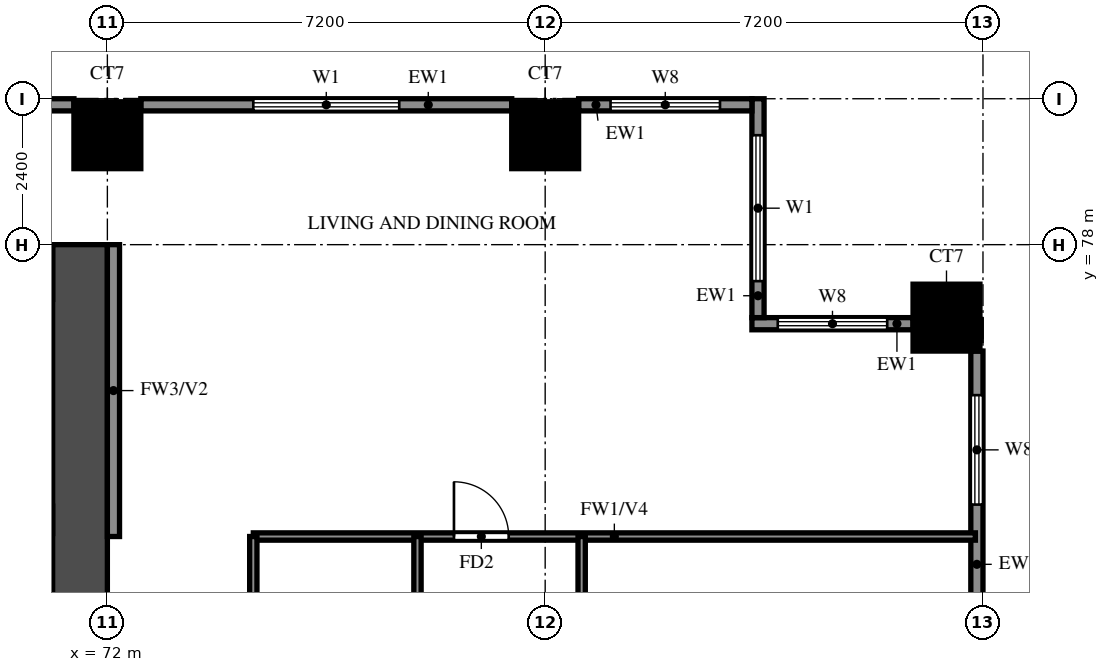
"""IFC4 building model, lengths in metres.
Left out: names, types, materials, properties, quantities, classifications, styles, units other than length and angle.
Written with IfcOpenShell. Run it as: python <this file> out.ifc"""

import sys

from ifc_helpers import new_model, si_unit, direction, frame, frame_2d, origin, origin_2d, place, context, subcontext, project, spatial, rectangle, extrude, source, transform, mapped, element, fill, save


model = new_model("IFC4")
c1 = context("Model", 3, precision=1e-05, world=origin(), true_north=direction((0.0, 1.0)))
c2 = subcontext(c1, "Body", "Model", "MODEL_VIEW")
j1 = project(units=[si_unit("LENGTHUNIT", "METRE"), si_unit("PLANEANGLEUNIT", "RADIAN")], contexts=[c1])
p1 = place(None, origin())
s1 = spatial("IfcSite", under=j1, at=p1, CompositionType="ELEMENT")
p2 = place(p1, origin())
s2 = spatial("IfcBuilding", under=s1, at=p2, CompositionType="ELEMENT")
p3 = place(p2, frame((0.0, 0.0, 51.5)))
s3 = spatial("IfcBuildingStorey", under=s2, at=p3, CompositionType="ELEMENT", Elevation=51.5)
m1 = source(origin(), c2, "Body", "SweptSolid", [
    extrude(rectangle(XDim=1.1, YDim=1.1, at=origin_2d()), origin(), (0.0, 0.0, 1.0), 3.18),
])
for number, where, z_axis, x_axis in (
    (1, (85.8, 76.8, 0.0), (0.0, 0.0, 1.0), (1.0, 0.0, 0.0)),
    (2, (72.0, 79.8, 0.0), (0.0, 0.0, 1.0), (1.0, 0.0, 0.0)),
    (3, (79.2, 79.8, 0.0), (0.0, 0.0, 1.0), (1.0, 0.0, 0.0)),
):
    element("IfcColumn", number, at=place(p3, frame(where, z_axis=z_axis, x_axis=x_axis)), inside=s3, PredefinedType="COLUMN", context=c2, shape_type="MappedRepresentation", body=[
        mapped(m1, transform((0.0, 0.0, 0.0))),
    ])
p4 = place(p3, frame((71.55, 66.0, 0.0), z_axis=(0.0, 0.0, 1.0), x_axis=(0.0, 1.0, 0.0)))
e4 = element("IfcWall", 4, at=p4, inside=s3, PredefinedType="SHEAR", context=c2, shape_type="SweptSolid", body=[
    extrude(rectangle(XDim=12.0, YDim=0.9, at=frame_2d((6.0, 0.0))), origin(), (0.0, 0.0, 1.0), 3.18),
])
p5 = place(p3, frame((29.7, 77.55, 0.0), z_axis=(0.0, 0.0, 1.0), x_axis=(1.0, 0.0, 0.0)))
e5 = element("IfcWall", 5, at=p5, inside=s3, PredefinedType="SHEAR", context=c2, shape_type="SweptSolid", body=[
    extrude(rectangle(XDim=41.4, YDim=0.9, at=frame_2d((20.7, 0.0))), origin(), (0.0, 0.0, 1.0), 3.18),
])
p6 = place(p3, frame((86.3, 70.15, 0.0), z_axis=(0.0, 0.0, 1.0), x_axis=(0.0, 1.0, 0.0)))
e6 = element("IfcWall", 6, at=p6, inside=s3, PredefinedType="SOLIDWALL", context=c2, shape_type="SweptSolid", body=[
    extrude(rectangle(XDim=6.1, YDim=0.2, at=frame_2d((3.05, 0.0))), origin(), (0.0, 0.0, 1.0), 3.18),
])
p7 = place(p6, frame((1.175, 0.0, 1.5)))
e7 = element("IfcOpeningElement", 7, at=p7, cuts=e6, PredefinedType="OPENING", context=c2, shape_type="SweptSolid", body=[
    extrude(rectangle(XDim=0.9, YDim=0.9, at=frame_2d((0.45, 0.45))), frame((0.0, 0.11, 0.0), z_axis=(0.0, -1.0, 0.0), x_axis=(1.0, 0.0, 0.0)), (0.0, 0.0, 1.0), 0.22),
])
p8 = place(p6, frame((3.575, 0.0, 0.6)))
e8 = element("IfcOpeningElement", 8, at=p8, cuts=e6, PredefinedType="OPENING", context=c2, shape_type="SweptSolid", body=[
    extrude(rectangle(XDim=1.8, YDim=2.4, at=frame_2d((0.9, 1.2))), frame((0.0, 0.11, 0.0), z_axis=(0.0, -1.0, 0.0), x_axis=(1.0, 0.0, 0.0)), (0.0, 0.0, 1.0), 0.22),
])
p9 = place(p3, frame((85.25, 76.7, 0.0), z_axis=(0.0, 0.0, 1.0), x_axis=(-1.0, 0.0, 0.0)))
e9 = element("IfcWall", 9, at=p9, inside=s3, PredefinedType="SOLIDWALL", context=c2, shape_type="SweptSolid", body=[
    extrude(rectangle(XDim=2.65, YDim=0.2, at=frame_2d((1.325, 0.0))), origin(), (0.0, 0.0, 1.0), 3.18),
])
p10 = place(p9, frame((0.425, 0.0, 0.6)))
e10 = element("IfcOpeningElement", 10, at=p10, cuts=e9, PredefinedType="OPENING", context=c2, shape_type="SweptSolid", body=[
    extrude(rectangle(XDim=1.8, YDim=2.4, at=frame_2d((0.9, 1.2))), frame((0.0, 0.11, 0.0), z_axis=(0.0, -1.0, 0.0), x_axis=(1.0, 0.0, 0.0)), (0.0, 0.0, 1.0), 0.22),
])
p11 = place(p3, frame((82.7, 76.8, 0.0), z_axis=(0.0, 0.0, 1.0), x_axis=(0.0, 1.0, 0.0)))
e11 = element("IfcWall", 11, at=p11, inside=s3, PredefinedType="SOLIDWALL", context=c2, shape_type="SweptSolid", body=[
    extrude(rectangle(XDim=3.6, YDim=0.2, at=frame_2d((1.8, 0.0))), origin(), (0.0, 0.0, 1.0), 3.18),
])
p12 = place(p11, frame((0.6, 0.0, 0.6)))
e12 = element("IfcOpeningElement", 12, at=p12, cuts=e11, PredefinedType="OPENING", context=c2, shape_type="SweptSolid", body=[
    extrude(rectangle(XDim=2.4, YDim=2.4, at=frame_2d((1.2, 1.2))), frame((0.0, 0.11, 0.0), z_axis=(0.0, -1.0, 0.0), x_axis=(1.0, 0.0, 0.0)), (0.0, 0.0, 1.0), 0.22),
])
p13 = place(p3, frame((82.6, 80.3, 0.0), z_axis=(0.0, 0.0, 1.0), x_axis=(-1.0, 0.0, 0.0)))
e13 = element("IfcWall", 13, at=p13, inside=s3, PredefinedType="SOLIDWALL", context=c2, shape_type="SweptSolid", body=[
    extrude(rectangle(XDim=2.85, YDim=0.2, at=frame_2d((1.425, 0.0))), origin(), (0.0, 0.0, 1.0), 3.18),
])
p14 = place(p13, frame((0.525, 0.0, 0.6)))
e14 = element("IfcOpeningElement", 14, at=p14, cuts=e13, PredefinedType="OPENING", context=c2, shape_type="SweptSolid", body=[
    extrude(rectangle(XDim=1.8, YDim=2.4, at=frame_2d((0.9, 1.2))), frame((0.0, 0.11, 0.0), z_axis=(0.0, -1.0, 0.0), x_axis=(1.0, 0.0, 0.0)), (0.0, 0.0, 1.0), 0.22),
])
p15 = place(p3, frame((78.65, 80.3, 0.0), z_axis=(0.0, 0.0, 1.0), x_axis=(-1.0, 0.0, 0.0)))
e15 = element("IfcWall", 15, at=p15, inside=s3, PredefinedType="SOLIDWALL", context=c2, shape_type="SweptSolid", body=[
    extrude(rectangle(XDim=6.1, YDim=0.2, at=frame_2d((3.05, 0.0))), origin(), (0.0, 0.0, 1.0), 3.18),
])
p16 = place(p15, frame((1.85, 0.0, 0.6)))
e16 = element("IfcOpeningElement", 16, at=p16, cuts=e15, PredefinedType="OPENING", context=c2, shape_type="SweptSolid", body=[
    extrude(rectangle(XDim=2.4, YDim=2.4, at=frame_2d((1.2, 1.2))), frame((0.0, 0.11, 0.0), z_axis=(0.0, -1.0, 0.0), x_axis=(1.0, 0.0, 0.0)), (0.0, 0.0, 1.0), 0.22),
])
p17 = place(p3, frame((71.45, 80.3, 0.0), z_axis=(0.0, 0.0, 1.0), x_axis=(-1.0, 0.0, 0.0)))
e17 = element("IfcWall", 17, at=p17, inside=s3, PredefinedType="SOLIDWALL", context=c2, shape_type="SweptSolid", body=[
    extrude(rectangle(XDim=6.1, YDim=0.2, at=frame_2d((3.05, 0.0))), origin(), (0.0, 0.0, 1.0), 3.18),
])
p18 = place(p3, frame((72.1, 73.2, 0.0), z_axis=(0.0, 0.0, 1.0), x_axis=(0.0, 1.0, 0.0)))
e18 = element("IfcWall", 18, at=p18, inside=s3, PredefinedType="SOLIDWALL", context=c2, shape_type="SweptSolid", body=[
    extrude(rectangle(XDim=4.8, YDim=0.2, at=frame_2d((2.4, 0.0))), origin(), (0.0, 0.0, 1.0), 3.18),
])
p19 = place(p3, frame((74.4, 73.2, 0.0), z_axis=(0.0, 0.0, 1.0), x_axis=(1.0, 0.0, 0.0)))
e19 = element("IfcWall", 19, at=p19, inside=s3, PredefinedType="PARTITIONING", context=c2, shape_type="SweptSolid", body=[
    extrude(rectangle(XDim=11.875, YDim=0.12, at=frame_2d((5.938, 0.0))), origin(), (0.0, 0.0, 1.0), 2.28),
])
p20 = place(p19, frame((3.3, 0.0, 0.0)))
e20 = element("IfcOpeningElement", 20, at=p20, cuts=e19, PredefinedType="OPENING", context=c2, shape_type="SweptSolid", body=[
    extrude(rectangle(XDim=0.9, YDim=2.1, at=frame_2d((0.45, 1.05))), frame((0.0, 0.07, 0.0), z_axis=(0.0, -1.0, 0.0), x_axis=(1.0, 0.0, 0.0)), (0.0, 0.0, 1.0), 0.14),
])
p21 = place(p3, frame((74.4, 69.85, 0.0), z_axis=(0.0, 0.0, 1.0), x_axis=(0.0, 1.0, 0.0)))
e21 = element("IfcWall", 21, at=p21, inside=s3, PredefinedType="PARTITIONING", context=c2, shape_type="SweptSolid", body=[
    extrude(rectangle(XDim=3.35, YDim=0.12, at=frame_2d((1.675, 0.0))), origin(), (0.0, 0.0, 1.0), 3.18),
])
p22 = place(p3, frame((77.1, 61.2, 0.0), z_axis=(0.0, 0.0, 1.0), x_axis=(0.0, 1.0, 0.0)))
e22 = element("IfcWall", 22, at=p22, inside=s3, PredefinedType="PARTITIONING", context=c2, shape_type="SweptSolid", body=[
    extrude(rectangle(XDim=12.0, YDim=0.12, at=frame_2d((6.0, 0.0))), origin(), (0.0, 0.0, 1.0), 3.18),
])
p23 = place(p22, frame((1.475, 0.0, 0.0)))
e23 = element("IfcOpeningElement", 23, at=p23, cuts=e22, PredefinedType="OPENING", context=c2, shape_type="SweptSolid", body=[
    extrude(rectangle(XDim=0.9, YDim=2.1, at=frame_2d((0.45, 1.05))), frame((0.0, 0.07, 0.0), z_axis=(0.0, -1.0, 0.0), x_axis=(1.0, 0.0, 0.0)), (0.0, 0.0, 1.0), 0.14),
])
p24 = place(p22, frame((5.8, 0.0, 0.0)))
e24 = element("IfcOpeningElement", 24, at=p24, cuts=e22, PredefinedType="OPENING", context=c2, shape_type="SweptSolid", body=[
    extrude(rectangle(XDim=0.9, YDim=2.1, at=frame_2d((0.45, 1.05))), frame((0.0, 0.07, 0.0), z_axis=(0.0, -1.0, 0.0), x_axis=(1.0, 0.0, 0.0)), (0.0, 0.0, 1.0), 0.14),
])
p25 = place(p22, frame((9.925, 0.0, 0.0)))
e25 = element("IfcOpeningElement", 25, at=p25, cuts=e22, PredefinedType="OPENING", context=c2, shape_type="SweptSolid", body=[
    extrude(rectangle(XDim=0.8, YDim=2.1, at=frame_2d((0.4, 1.05))), frame((0.0, 0.07, 0.0), z_axis=(0.0, -1.0, 0.0), x_axis=(1.0, 0.0, 0.0)), (0.0, 0.0, 1.0), 0.14),
])
p26 = place(p3, frame((79.8, 69.6, 0.0), z_axis=(0.0, 0.0, 1.0), x_axis=(0.0, 1.0, 0.0)))
e26 = element("IfcWall", 26, at=p26, inside=s3, PredefinedType="PARTITIONING", context=c2, shape_type="SweptSolid", body=[
    extrude(rectangle(XDim=3.6, YDim=0.12, at=frame_2d((1.8, 0.0))), origin(), (0.0, 0.0, 1.0), 3.18),
])
p27 = place(p8, origin())
e27 = element("IfcWindow", 27, at=p27, inside=s3, PartitioningType="DOUBLE_PANEL_VERTICAL", PredefinedType="WINDOW", context=c2, shape_type="SweptSolid", body=[
    extrude(rectangle(XDim=1.8, YDim=2.4, at=frame_2d((0.9, 1.2))), frame((0.0, 0.03, 0.0), z_axis=(0.0, -1.0, 0.0), x_axis=(1.0, 0.0, 0.0)), (0.0, 0.0, 1.0), 0.06),
])
fill(e8, e27)
p28 = place(p10, origin())
e28 = element("IfcWindow", 28, at=p28, inside=s3, PartitioningType="DOUBLE_PANEL_VERTICAL", PredefinedType="WINDOW", context=c2, shape_type="SweptSolid", body=[
    extrude(rectangle(XDim=1.8, YDim=2.4, at=frame_2d((0.9, 1.2))), frame((0.0, 0.03, 0.0), z_axis=(0.0, -1.0, 0.0), x_axis=(1.0, 0.0, 0.0)), (0.0, 0.0, 1.0), 0.06),
])
fill(e10, e28)
p29 = place(p12, origin())
e29 = element("IfcWindow", 29, at=p29, inside=s3, PartitioningType="DOUBLE_PANEL_VERTICAL", PredefinedType="WINDOW", context=c2, shape_type="SweptSolid", body=[
    extrude(rectangle(XDim=2.4, YDim=2.4, at=frame_2d((1.2, 1.2))), frame((0.0, 0.03, 0.0), z_axis=(0.0, -1.0, 0.0), x_axis=(1.0, 0.0, 0.0)), (0.0, 0.0, 1.0), 0.06),
])
fill(e12, e29)
p30 = place(p14, origin())
e30 = element("IfcWindow", 30, at=p30, inside=s3, PartitioningType="DOUBLE_PANEL_VERTICAL", PredefinedType="WINDOW", context=c2, shape_type="SweptSolid", body=[
    extrude(rectangle(XDim=1.8, YDim=2.4, at=frame_2d((0.9, 1.2))), frame((0.0, 0.03, 0.0), z_axis=(0.0, -1.0, 0.0), x_axis=(1.0, 0.0, 0.0)), (0.0, 0.0, 1.0), 0.06),
])
fill(e14, e30)
p31 = place(p16, origin())
e31 = element("IfcWindow", 31, at=p31, inside=s3, PartitioningType="DOUBLE_PANEL_VERTICAL", PredefinedType="WINDOW", context=c2, shape_type="SweptSolid", body=[
    extrude(rectangle(XDim=2.4, YDim=2.4, at=frame_2d((1.2, 1.2))), frame((0.0, 0.03, 0.0), z_axis=(0.0, -1.0, 0.0), x_axis=(1.0, 0.0, 0.0)), (0.0, 0.0, 1.0), 0.06),
])
fill(e16, e31)
p32 = place(p20, origin())
e32 = element("IfcDoor", 32, at=p32, inside=s3, OperationType="SINGLE_SWING_RIGHT", PredefinedType="DOOR", context=c2, shape_type="SweptSolid", body=[
    extrude(rectangle(XDim=0.9, YDim=2.1, at=frame_2d((0.45, 1.05))), frame((0.0, 0.025, 0.0), z_axis=(0.0, -1.0, 0.0), x_axis=(1.0, 0.0, 0.0)), (0.0, 0.0, 1.0), 0.05),
])
fill(e20, e32)
save(model, sys.argv[1])
